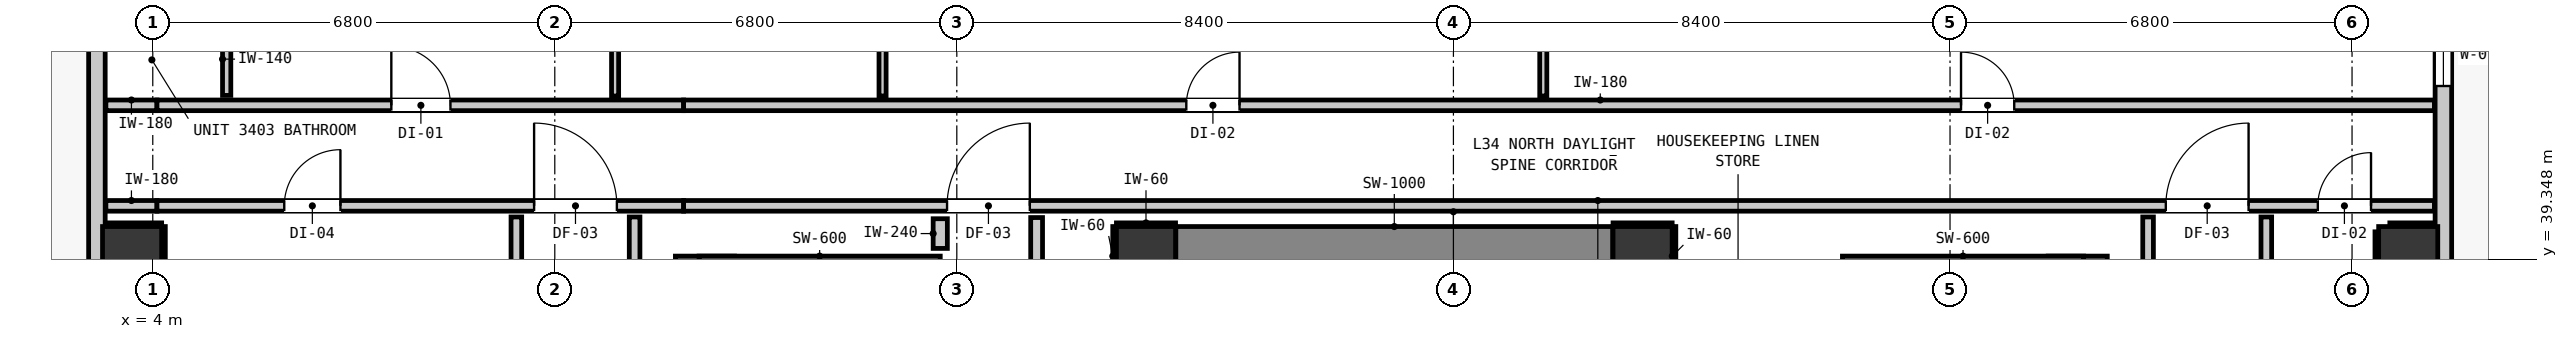
"""IFC4 building model, lengths in metres.
Left out: names, types, materials, properties, quantities, classifications, styles, units other than length and angle.
Written with IfcOpenShell. Run it as: python <this file> out.ifc"""

import sys

from ifc_helpers import new_model, si_unit, direction, frame, frame_2d, origin, origin_2d, place, context, subcontext, project, spatial, rectangle, extrude, element, fill, save


model = new_model("IFC4")
c1 = context("Model", 3, precision=1e-05, world=origin(), true_north=direction((0.0, 1.0)))
c2 = subcontext(c1, "Body", "Model", "MODEL_VIEW")
j1 = project(units=[si_unit("LENGTHUNIT", "METRE"), si_unit("PLANEANGLEUNIT", "RADIAN")], contexts=[c1])
p1 = place(None, origin())
s1 = spatial("IfcSite", under=j1, at=p1, CompositionType="ELEMENT")
p2 = place(p1, origin())
s2 = spatial("IfcBuilding", under=s1, at=p2, CompositionType="ELEMENT")
p3 = place(p2, frame((0.0, 0.0, 119.36)))
s3 = spatial("IfcBuildingStorey", under=s2, at=p3, CompositionType="ELEMENT", Elevation=119.36)
for number, where, z_axis, x_axis in (
    (1, (20.8, 39.4, 0.0), (0.0, 0.0, 1.0), (1.0, 0.0, 0.0)),
    (2, (29.2, 39.4, 0.0), (0.0, 0.0, 1.0), (1.0, 0.0, 0.0)),
):
    element("IfcColumn", number, at=place(p3, frame(where, z_axis=z_axis, x_axis=x_axis)), inside=s3, PredefinedType="COLUMN", context=c2, shape_type="SweptSolid", body=[
        extrude(rectangle(XDim=1.0, YDim=1.0, at=origin_2d()), origin(), (0.0, 0.0, 1.0), 3.32),
    ])
p4 = place(p3, frame((13.34, 31.205, 0.0), z_axis=(0.0, 0.0, 1.0), x_axis=(0.0, 1.0, 0.0)))
e3 = element("IfcWall", 3, at=p4, inside=s3, PredefinedType="SHEAR", context=c2, shape_type="SweptSolid", body=[
    extrude(rectangle(XDim=8.195, YDim=1.0, at=frame_2d((4.097, 0.0))), origin(), (0.0, 0.0, 1.0), 3.32),
])
p5 = place(p3, frame((13.24, 39.1, 0.0), z_axis=(0.0, 0.0, 1.0), x_axis=(1.0, 0.0, 0.0)))
e4 = element("IfcWall", 4, at=p5, inside=s3, PredefinedType="SHEAR", context=c2, shape_type="SweptSolid", body=[
    extrude(rectangle(XDim=4.08, YDim=0.6, at=frame_2d((2.04, 0.0))), origin(), (0.0, 0.0, 1.0), 3.32),
])
p6 = place(p3, frame((36.56, 31.205, 0.0), z_axis=(0.0, 0.0, 1.0), x_axis=(0.0, 1.0, 0.0)))
e5 = element("IfcWall", 5, at=p6, inside=s3, PredefinedType="SHEAR", context=c2, shape_type="SweptSolid", body=[
    extrude(rectangle(XDim=8.195, YDim=1.0, at=frame_2d((4.097, 0.0))), origin(), (0.0, 0.0, 1.0), 3.32),
])
p7 = place(p3, frame((32.58, 39.1, 0.0), z_axis=(0.0, 0.0, 1.0), x_axis=(1.0, 0.0, 0.0)))
e6 = element("IfcWall", 6, at=p7, inside=s3, PredefinedType="SHEAR", context=c2, shape_type="SweptSolid", body=[
    extrude(rectangle(XDim=4.08, YDim=0.6, at=frame_2d((2.04, 0.0))), origin(), (0.0, 0.0, 1.0), 3.32),
])
p8 = place(p3, frame((21.305, 39.4, 0.0), z_axis=(0.0, 0.0, 1.0), x_axis=(1.0, 0.0, 0.0)))
e7 = element("IfcWall", 7, at=p8, inside=s3, PredefinedType="SHEAR", context=c2, shape_type="SweptSolid", body=[
    extrude(rectangle(XDim=7.39, YDim=1.0, at=frame_2d((3.695, 0.0))), origin(), (0.0, 0.0, 1.0), 3.32),
])
for number, where, z_axis, x_axis in (
    (8, (3.65, 39.4, 0.0), (0.0, 0.0, 1.0), (1.0, 0.0, 0.0)),
    (9, (42.15, 39.4, 0.0), (0.0, 0.0, 1.0), (1.0, 0.0, 0.0)),
):
    element("IfcColumn", number, at=place(p3, frame(where, z_axis=z_axis, x_axis=x_axis)), inside=s3, PredefinedType="COLUMN", context=c2, shape_type="SweptSolid", body=[
        extrude(rectangle(XDim=1.0, YDim=1.0, at=origin_2d()), origin(), (0.0, 0.0, 1.0), 3.32),
    ])
p9 = place(p3, frame((3.055, 11.355, 0.0), z_axis=(0.0, 0.0, 1.0), x_axis=(0.0, 1.0, 0.0)))
e10 = element("IfcWall", 10, at=p9, inside=s3, PredefinedType="STANDARD", context=c2, shape_type="SweptSolid", body=[
    extrude(rectangle(XDim=32.29, YDim=0.28, at=frame_2d((16.145, 0.0))), origin(), (0.0, 0.0, 1.0), 3.08),
])
p10 = place(p9, frame((5.818, 0.0, 0.0)))
e11 = element("IfcOpeningElement", 11, at=p10, cuts=e10, PredefinedType="OPENING", context=c2, shape_type="SweptSolid", body=[
    extrude(rectangle(XDim=1.0, YDim=2.15, at=frame_2d((0.5, 1.075))), frame((0.0, 0.15, 0.0), z_axis=(0.0, -1.0, 0.0), x_axis=(1.0, 0.0, 0.0)), (0.0, 0.0, 1.0), 0.3),
])
p11 = place(p9, frame((0.545, 0.0, 0.85)))
e12 = element("IfcOpeningElement", 12, at=p11, cuts=e10, PredefinedType="OPENING", context=c2, shape_type="SweptSolid", body=[
    extrude(rectangle(XDim=1.05, YDim=1.65, at=frame_2d((0.525, 0.825))), frame((0.0, 0.15, 0.0), z_axis=(0.0, -1.0, 0.0), x_axis=(1.0, 0.0, 0.0)), (0.0, 0.0, 1.0), 0.3),
])
p12 = place(p9, frame((13.495, 0.0, 0.85)))
e13 = element("IfcOpeningElement", 13, at=p12, cuts=e10, PredefinedType="OPENING", context=c2, shape_type="SweptSolid", body=[
    extrude(rectangle(XDim=3.0, YDim=2.1, at=frame_2d((1.5, 1.05))), frame((0.0, 0.15, 0.0), z_axis=(0.0, -1.0, 0.0), x_axis=(1.0, 0.0, 0.0)), (0.0, 0.0, 1.0), 0.3),
])
p13 = place(p3, frame((42.745, 43.645, 0.0), z_axis=(0.0, 0.0, 1.0), x_axis=(0.0, -1.0, 0.0)))
e14 = element("IfcWall", 14, at=p13, inside=s3, PredefinedType="STANDARD", context=c2, shape_type="SweptSolid", body=[
    extrude(rectangle(XDim=32.29, YDim=0.28, at=frame_2d((16.145, 0.0))), origin(), (0.0, 0.0, 1.0), 3.08),
])
p14 = place(p13, frame((5.467, 0.0, 0.0)))
e15 = element("IfcOpeningElement", 15, at=p14, cuts=e14, PredefinedType="OPENING", context=c2, shape_type="SweptSolid", body=[
    extrude(rectangle(XDim=1.0, YDim=2.15, at=frame_2d((0.5, 1.075))), frame((0.0, 0.15, 0.0), z_axis=(0.0, -1.0, 0.0), x_axis=(1.0, 0.0, 0.0)), (0.0, 0.0, 1.0), 0.3),
])
p15 = place(p13, frame((28.098, 0.0, 0.85)))
e16 = element("IfcOpeningElement", 16, at=p15, cuts=e14, PredefinedType="OPENING", context=c2, shape_type="SweptSolid", body=[
    extrude(rectangle(XDim=3.0, YDim=2.1, at=frame_2d((1.5, 1.05))), frame((0.0, 0.15, 0.0), z_axis=(0.0, -1.0, 0.0), x_axis=(1.0, 0.0, 0.0)), (0.0, 0.0, 1.0), 0.3),
])
p16 = place(p13, frame((0.318, 0.0, 0.85)))
e17 = element("IfcOpeningElement", 17, at=p16, cuts=e14, PredefinedType="OPENING", context=c2, shape_type="SweptSolid", body=[
    extrude(rectangle(XDim=1.05, YDim=1.65, at=frame_2d((0.525, 0.825))), frame((0.0, 0.15, 0.0), z_axis=(0.0, -1.0, 0.0), x_axis=(1.0, 0.0, 0.0)), (0.0, 0.0, 1.0), 0.3),
])
p17 = place(p13, frame((14.883, 0.0, 0.85)))
e18 = element("IfcOpeningElement", 18, at=p17, cuts=e14, PredefinedType="OPENING", context=c2, shape_type="SweptSolid", body=[
    extrude(rectangle(XDim=3.0, YDim=2.1, at=frame_2d((1.5, 1.05))), frame((0.0, 0.15, 0.0), z_axis=(0.0, -1.0, 0.0), x_axis=(1.0, 0.0, 0.0)), (0.0, 0.0, 1.0), 0.3),
])
p18 = place(p3, frame((3.207, 40.25, 0.0), z_axis=(0.0, 0.0, 1.0), x_axis=(1.0, 0.0, 0.0)))
e19 = element("IfcWall", 19, at=p18, inside=s3, PredefinedType="PARTITIONING", context=c2, shape_type="SweptSolid", body=[
    extrude(rectangle(XDim=0.864, YDim=0.18, at=frame_2d((0.432, 0.0))), origin(), (0.0, 0.0, 1.0), 3.08),
])
p19 = place(p3, frame((4.071, 40.25, 0.0), z_axis=(0.0, 0.0, 1.0), x_axis=(1.0, 0.0, 0.0)))
e20 = element("IfcWall", 20, at=p19, inside=s3, PredefinedType="PARTITIONING", context=c2, shape_type="SweptSolid", body=[
    extrude(rectangle(XDim=8.908, YDim=0.18, at=frame_2d((4.454, 0.0))), origin(), (0.0, 0.0, 1.0), 2.565),
])
p20 = place(p19, frame((6.379, 0.0, 0.0)))
e21 = element("IfcOpeningElement", 21, at=p20, cuts=e20, PredefinedType="OPENING", context=c2, shape_type="SweptSolid", body=[
    extrude(rectangle(XDim=1.4, YDim=2.15, at=frame_2d((0.7, 1.075))), frame((0.0, 0.1, 0.0), z_axis=(0.0, -1.0, 0.0), x_axis=(1.0, 0.0, 0.0)), (0.0, 0.0, 1.0), 0.2),
])
p21 = place(p19, frame((2.153, 0.0, 0.0)))
e22 = element("IfcOpeningElement", 22, at=p21, cuts=e20, PredefinedType="OPENING", context=c2, shape_type="SweptSolid", body=[
    extrude(rectangle(XDim=0.95, YDim=2.1, at=frame_2d((0.475, 1.05))), frame((0.0, 0.1, 0.0), z_axis=(0.0, -1.0, 0.0), x_axis=(1.0, 0.0, 0.0)), (0.0, 0.0, 1.0), 0.2),
])
p22 = place(p3, frame((12.979, 40.25, 0.0), z_axis=(0.0, 0.0, 1.0), x_axis=(1.0, 0.0, 0.0)))
e23 = element("IfcWall", 23, at=p22, inside=s3, PredefinedType="PARTITIONING", context=c2, shape_type="SweptSolid", body=[
    extrude(rectangle(XDim=29.614, YDim=0.18, at=frame_2d((14.807, 0.0))), origin(), (0.0, 0.0, 1.0), 3.08),
])
p23 = place(p22, frame((4.456, 0.0, 0.0)))
e24 = element("IfcOpeningElement", 24, at=p23, cuts=e23, PredefinedType="OPENING", context=c2, shape_type="SweptSolid", body=[
    extrude(rectangle(XDim=1.4, YDim=2.15, at=frame_2d((0.7, 1.075))), frame((0.0, 0.1, 0.0), z_axis=(0.0, -1.0, 0.0), x_axis=(1.0, 0.0, 0.0)), (0.0, 0.0, 1.0), 0.2),
])
p24 = place(p22, frame((25.071, 0.0, 0.0)))
e25 = element("IfcOpeningElement", 25, at=p24, cuts=e23, PredefinedType="OPENING", context=c2, shape_type="SweptSolid", body=[
    extrude(rectangle(XDim=1.4, YDim=2.15, at=frame_2d((0.7, 1.075))), frame((0.0, 0.1, 0.0), z_axis=(0.0, -1.0, 0.0), x_axis=(1.0, 0.0, 0.0)), (0.0, 0.0, 1.0), 0.2),
])
p25 = place(p22, frame((27.642, 0.0, 0.0)))
e26 = element("IfcOpeningElement", 26, at=p25, cuts=e23, PredefinedType="OPENING", context=c2, shape_type="SweptSolid", body=[
    extrude(rectangle(XDim=0.9, YDim=2.1, at=frame_2d((0.45, 1.05))), frame((0.0, 0.1, 0.0), z_axis=(0.0, -1.0, 0.0), x_axis=(1.0, 0.0, 0.0)), (0.0, 0.0, 1.0), 0.2),
])
p26 = place(p3, frame((3.207, 41.95, 0.0), z_axis=(0.0, 0.0, 1.0), x_axis=(1.0, 0.0, 0.0)))
e27 = element("IfcWall", 27, at=p26, inside=s3, PredefinedType="PARTITIONING", context=c2, shape_type="SweptSolid", body=[
    extrude(rectangle(XDim=0.864, YDim=0.18, at=frame_2d((0.432, 0.0))), origin(), (0.0, 0.0, 1.0), 3.08),
])
p27 = place(p3, frame((4.071, 41.95, 0.0), z_axis=(0.0, 0.0, 1.0), x_axis=(1.0, 0.0, 0.0)))
e28 = element("IfcWall", 28, at=p27, inside=s3, PredefinedType="PARTITIONING", context=c2, shape_type="SweptSolid", body=[
    extrude(rectangle(XDim=8.908, YDim=0.18, at=frame_2d((4.454, 0.0))), origin(), (0.0, 0.0, 1.0), 2.565),
])
p28 = place(p27, frame((3.964, 0.0, 0.0)))
e29 = element("IfcOpeningElement", 29, at=p28, cuts=e28, PredefinedType="OPENING", context=c2, shape_type="SweptSolid", body=[
    extrude(rectangle(XDim=1.0, YDim=2.15, at=frame_2d((0.5, 1.075))), frame((0.0, 0.1, 0.0), z_axis=(0.0, -1.0, 0.0), x_axis=(1.0, 0.0, 0.0)), (0.0, 0.0, 1.0), 0.2),
])
p29 = place(p3, frame((12.979, 41.95, 0.0), z_axis=(0.0, 0.0, 1.0), x_axis=(1.0, 0.0, 0.0)))
e30 = element("IfcWall", 30, at=p29, inside=s3, PredefinedType="PARTITIONING", context=c2, shape_type="SweptSolid", body=[
    extrude(rectangle(XDim=29.614, YDim=0.18, at=frame_2d((14.807, 0.0))), origin(), (0.0, 0.0, 1.0), 3.08),
])
p30 = place(p29, frame((8.503, 0.0, 0.0)))
e31 = element("IfcOpeningElement", 31, at=p30, cuts=e30, PredefinedType="OPENING", context=c2, shape_type="SweptSolid", body=[
    extrude(rectangle(XDim=0.9, YDim=2.1, at=frame_2d((0.45, 1.05))), frame((0.0, 0.1, 0.0), z_axis=(0.0, -1.0, 0.0), x_axis=(1.0, 0.0, 0.0)), (0.0, 0.0, 1.0), 0.2),
])
p31 = place(p29, frame((21.607, 0.0, 0.0)))
e32 = element("IfcOpeningElement", 32, at=p31, cuts=e30, PredefinedType="OPENING", context=c2, shape_type="SweptSolid", body=[
    extrude(rectangle(XDim=0.9, YDim=2.1, at=frame_2d((0.45, 1.05))), frame((0.0, 0.1, 0.0), z_axis=(0.0, -1.0, 0.0), x_axis=(1.0, 0.0, 0.0)), (0.0, 0.0, 1.0), 0.2),
])
p32 = place(p3, frame((17.32, 39.53, 0.0), z_axis=(0.0, 0.0, 1.0), x_axis=(0.0, 1.0, 0.0)))
e33 = element("IfcWall", 33, at=p32, inside=s3, PredefinedType="PARTITIONING", context=c2, shape_type="SweptSolid", body=[
    extrude(rectangle(XDim=0.502, YDim=0.24, at=frame_2d((0.251, 0.0))), origin(), (0.0, 0.0, 1.0), 3.08),
])
p33 = place(p3, frame((18.95, 38.918, 0.0), z_axis=(0.0, 0.0, 1.0), x_axis=(0.0, 1.0, 0.0)))
e34 = element("IfcWall", 34, at=p33, inside=s3, PredefinedType="PARTITIONING", context=c2, shape_type="SweptSolid", body=[
    extrude(rectangle(XDim=1.134, YDim=0.2, at=frame_2d((0.567, 0.0))), origin(), (0.0, 0.0, 1.0), 3.08),
])
p34 = place(p3, frame((10.15, 36.818, 0.0), z_axis=(0.0, 0.0, 1.0), x_axis=(0.0, 1.0, 0.0)))
e35 = element("IfcWall", 35, at=p34, inside=s3, PredefinedType="PARTITIONING", context=c2, shape_type="SweptSolid", body=[
    extrude(rectangle(XDim=3.244, YDim=0.18, at=frame_2d((1.622, 0.0))), origin(), (0.0, 0.0, 1.0), 3.08),
])
for number, where, z_axis, x_axis in (
    (36, (12.15, 21.368, 0.0), (0.0, 0.0, 1.0), (0.0, 1.0, 0.0)),
    (37, (37.75, 21.368, 0.0), (0.0, 0.0, 1.0), (0.0, 1.0, 0.0)),
):
    element("IfcWall", number, at=place(p3, frame(where, z_axis=z_axis, x_axis=x_axis)), inside=s3, PredefinedType="PARTITIONING", context=c2, shape_type="SweptSolid", body=[
        extrude(rectangle(XDim=18.694, YDim=0.18, at=frame_2d((9.347, 0.0))), origin(), (0.0, 0.0, 1.0), 3.08),
    ])
p35 = place(p3, frame((39.75, 34.158, 0.0), z_axis=(0.0, 0.0, 1.0), x_axis=(0.0, 1.0, 0.0)))
e38 = element("IfcWall", 38, at=p35, inside=s3, PredefinedType="PARTITIONING", context=c2, shape_type="SweptSolid", body=[
    extrude(rectangle(XDim=5.904, YDim=0.18, at=frame_2d((2.952, 0.0))), origin(), (0.0, 0.0, 1.0), 3.08),
])
p36 = place(p3, frame((5.25, 42.118, 0.0), z_axis=(0.0, 0.0, 1.0), x_axis=(0.0, 1.0, 0.0)))
e39 = element("IfcWall", 39, at=p36, inside=s3, PredefinedType="PARTITIONING", context=c2, shape_type="SweptSolid", body=[
    extrude(rectangle(XDim=3.507, YDim=0.14, at=frame_2d((1.753, 0.0))), origin(), (0.0, 0.0, 1.0), 3.08),
])
p37 = place(p36, frame((1.327, 0.0, 0.0)))
e40 = element("IfcOpeningElement", 40, at=p37, cuts=e39, PredefinedType="OPENING", context=c2, shape_type="SweptSolid", body=[
    extrude(rectangle(XDim=0.86, YDim=2.02, at=frame_2d((0.43, 1.01))), frame((0.0, 0.08, 0.0), z_axis=(0.0, -1.0, 0.0), x_axis=(1.0, 0.0, 0.0)), (0.0, 0.0, 1.0), 0.16),
])
p38 = place(p3, frame((11.82, 42.108, 0.0), z_axis=(0.0, 0.0, 1.0), x_axis=(0.0, 1.0, 0.0)))
e41 = element("IfcWall", 41, at=p38, inside=s3, PredefinedType="PARTITIONING", context=c2, shape_type="SweptSolid", body=[
    extrude(rectangle(XDim=3.685, YDim=0.12, at=frame_2d((1.843, 0.0))), origin(), (0.0, 0.0, 1.0), 3.08),
])
p39 = place(p38, frame((1.317, 0.0, 0.0)))
e42 = element("IfcOpeningElement", 42, at=p39, cuts=e41, PredefinedType="OPENING", context=c2, shape_type="SweptSolid", body=[
    extrude(rectangle(XDim=0.9, YDim=2.1, at=frame_2d((0.45, 1.05))), frame((0.0, 0.07, 0.0), z_axis=(0.0, -1.0, 0.0), x_axis=(1.0, 0.0, 0.0)), (0.0, 0.0, 1.0), 0.14),
])
for number, where, z_axis, x_axis in (
    (43, (16.344, 42.108, 0.0), (0.0, 0.0, 1.0), (0.0, 1.0, 0.0)),
    (44, (27.52, 42.108, 0.0), (0.0, 0.0, 1.0), (0.0, 1.0, 0.0)),
):
    element("IfcWall", number, at=place(p3, frame(where, z_axis=z_axis, x_axis=x_axis)), inside=s3, PredefinedType="PARTITIONING", context=c2, shape_type="SweptSolid", body=[
        extrude(rectangle(XDim=3.685, YDim=0.12, at=frame_2d((1.843, 0.0))), origin(), (0.0, 0.0, 1.0), 3.08),
    ])
for number, where, z_axis, x_axis in (
    (45, (20.3, 39.932, 0.0), (0.0, 0.0, 1.0), (1.0, 0.0, 0.0)),
    (46, (20.268, 38.9, 0.0), (0.0, 0.0, 1.0), (0.0, 1.0, 0.0)),
    (47, (28.7, 39.932, 0.0), (0.0, 0.0, 1.0), (1.0, 0.0, 0.0)),
    (48, (29.732, 38.9, 0.0), (0.0, 0.0, 1.0), (0.0, 1.0, 0.0)),
):
    element("IfcWall", number, at=place(p3, frame(where, z_axis=z_axis, x_axis=x_axis)), inside=s3, PredefinedType="PARTITIONING", context=c2, shape_type="SweptSolid", body=[
        extrude(rectangle(XDim=1.0, YDim=0.06, at=frame_2d((0.5, 0.0))), origin(), (0.0, 0.0, 1.0), 1.45),
    ])
p40 = place(p3, frame((3.21, 39.932, 0.0), z_axis=(0.0, 0.0, 1.0), x_axis=(1.0, 0.0, 0.0)))
e49 = element("IfcWall", 49, at=p40, inside=s3, PredefinedType="PARTITIONING", context=c2, shape_type="SweptSolid", body=[
    extrude(rectangle(XDim=0.94, YDim=0.06, at=frame_2d((0.47, 0.0))), origin(), (0.0, 0.0, 1.0), 1.45),
])
p41 = place(p3, frame((4.182, 38.9, 0.0), z_axis=(0.0, 0.0, 1.0), x_axis=(0.0, 1.0, 0.0)))
e50 = element("IfcWall", 50, at=p41, inside=s3, PredefinedType="PARTITIONING", context=c2, shape_type="SweptSolid", body=[
    extrude(rectangle(XDim=1.0, YDim=0.06, at=frame_2d((0.5, 0.0))), origin(), (0.0, 0.0, 1.0), 1.45),
])
p42 = place(p3, frame((41.839, 39.932, 0.0), z_axis=(0.0, 0.0, 1.0), x_axis=(1.0, 0.0, 0.0)))
e51 = element("IfcWall", 51, at=p42, inside=s3, PredefinedType="PARTITIONING", context=c2, shape_type="SweptSolid", body=[
    extrude(rectangle(XDim=0.751, YDim=0.06, at=frame_2d((0.375, 0.0))), origin(), (0.0, 0.0, 1.0), 1.45),
])
p43 = place(p3, frame((41.618, 38.9, 0.0), z_axis=(0.0, 0.0, 1.0), x_axis=(0.0, 1.0, 0.0)))
e52 = element("IfcWall", 52, at=p43, inside=s3, PredefinedType="PARTITIONING", context=c2, shape_type="SweptSolid", body=[
    extrude(rectangle(XDim=0.911, YDim=0.06, at=frame_2d((0.456, 0.0))), origin(), (0.0, 0.0, 1.0), 1.45),
])
p44 = place(p16, origin())
e53 = element("IfcWindow", 53, at=p44, inside=s3, PartitioningType="SINGLE_PANEL", PredefinedType="WINDOW", context=c2, shape_type="SweptSolid", body=[
    extrude(rectangle(XDim=1.05, YDim=1.65, at=frame_2d((0.525, 0.825))), frame((0.0, 0.03, 0.0), z_axis=(0.0, -1.0, 0.0), x_axis=(1.0, 0.0, 0.0)), (0.0, 0.0, 1.0), 0.06),
])
fill(e17, e53)
p45 = place(p23, origin())
e54 = element("IfcDoor", 54, at=p45, inside=s3, OperationType="SINGLE_SWING_RIGHT", PredefinedType="DOOR", context=c2, shape_type="SweptSolid", body=[
    extrude(rectangle(XDim=1.4, YDim=2.15, at=frame_2d((0.7, 1.075))), frame((0.0, 0.025, 0.0), z_axis=(0.0, -1.0, 0.0), x_axis=(1.0, 0.0, 0.0)), (0.0, 0.0, 1.0), 0.05),
])
fill(e24, e54)
p46 = place(p20, origin())
e55 = element("IfcDoor", 55, at=p46, inside=s3, OperationType="SINGLE_SWING_LEFT", PredefinedType="DOOR", context=c2, shape_type="SweptSolid", body=[
    extrude(rectangle(XDim=1.4, YDim=2.15, at=frame_2d((0.7, 1.075))), frame((0.0, 0.025, 0.0), z_axis=(0.0, -1.0, 0.0), x_axis=(1.0, 0.0, 0.0)), (0.0, 0.0, 1.0), 0.05),
])
fill(e21, e55)
p47 = place(p24, origin())
e56 = element("IfcDoor", 56, at=p47, inside=s3, OperationType="SINGLE_SWING_RIGHT", PredefinedType="DOOR", context=c2, shape_type="SweptSolid", body=[
    extrude(rectangle(XDim=1.4, YDim=2.15, at=frame_2d((0.7, 1.075))), frame((0.0, 0.025, 0.0), z_axis=(0.0, -1.0, 0.0), x_axis=(1.0, 0.0, 0.0)), (0.0, 0.0, 1.0), 0.05),
])
fill(e25, e56)
p48 = place(p28, origin())
e57 = element("IfcDoor", 57, at=p48, inside=s3, OperationType="SINGLE_SWING_LEFT", PredefinedType="DOOR", context=c2, shape_type="SweptSolid", body=[
    extrude(rectangle(XDim=1.0, YDim=2.15, at=frame_2d((0.5, 1.075))), frame((0.0, 0.025, 0.0), z_axis=(0.0, -1.0, 0.0), x_axis=(1.0, 0.0, 0.0)), (0.0, 0.0, 1.0), 0.05),
])
fill(e29, e57)
p49 = place(p30, origin())
e58 = element("IfcDoor", 58, at=p49, inside=s3, OperationType="SINGLE_SWING_RIGHT", PredefinedType="DOOR", context=c2, shape_type="SweptSolid", body=[
    extrude(rectangle(XDim=0.9, YDim=2.1, at=frame_2d((0.45, 1.05))), frame((0.0, 0.025, 0.0), z_axis=(0.0, -1.0, 0.0), x_axis=(1.0, 0.0, 0.0)), (0.0, 0.0, 1.0), 0.05),
])
fill(e31, e58)
p50 = place(p31, origin())
e59 = element("IfcDoor", 59, at=p50, inside=s3, OperationType="SINGLE_SWING_LEFT", PredefinedType="DOOR", context=c2, shape_type="SweptSolid", body=[
    extrude(rectangle(XDim=0.9, YDim=2.1, at=frame_2d((0.45, 1.05))), frame((0.0, 0.025, 0.0), z_axis=(0.0, -1.0, 0.0), x_axis=(1.0, 0.0, 0.0)), (0.0, 0.0, 1.0), 0.05),
])
fill(e32, e59)
p51 = place(p21, origin())
e60 = element("IfcDoor", 60, at=p51, inside=s3, OperationType="SINGLE_SWING_RIGHT", PredefinedType="DOOR", context=c2, shape_type="SweptSolid", body=[
    extrude(rectangle(XDim=0.95, YDim=2.1, at=frame_2d((0.475, 1.05))), frame((0.0, 0.025, 0.0), z_axis=(0.0, -1.0, 0.0), x_axis=(1.0, 0.0, 0.0)), (0.0, 0.0, 1.0), 0.05),
])
fill(e22, e60)
p52 = place(p25, origin())
e61 = element("IfcDoor", 61, at=p52, inside=s3, OperationType="SINGLE_SWING_RIGHT", PredefinedType="DOOR", context=c2, shape_type="SweptSolid", body=[
    extrude(rectangle(XDim=0.9, YDim=2.1, at=frame_2d((0.45, 1.05))), frame((0.0, 0.025, 0.0), z_axis=(0.0, -1.0, 0.0), x_axis=(1.0, 0.0, 0.0)), (0.0, 0.0, 1.0), 0.05),
])
fill(e26, e61)
save(model, sys.argv[1])
